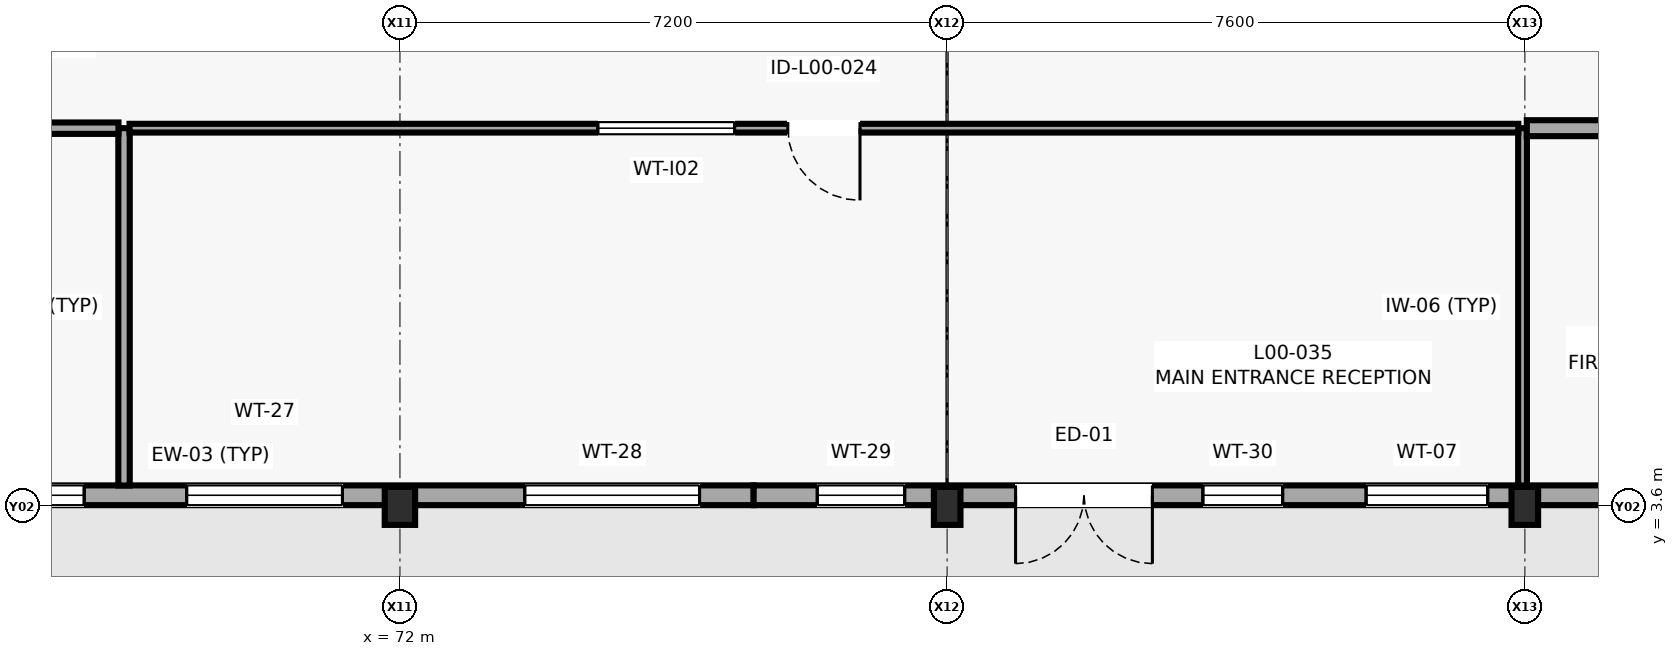
"""IFC4 building model, lengths in metres.
Left out: names, types, materials, properties, quantities, classifications, styles, units other than length and angle.
Written with IfcOpenShell. Run it as: python <this file> out.ifc"""

import sys

from ifc_helpers import new_model, si_unit, direction, frame, frame_2d, origin, origin_2d, place, context, subcontext, project, spatial, rectangle, extrude, element, fill, save


model = new_model("IFC4")
c1 = context("Model", 3, precision=1e-05, world=origin(), true_north=direction((0.0, 1.0)))
c2 = subcontext(c1, "Body", "Model", "MODEL_VIEW")
j1 = project(units=[si_unit("LENGTHUNIT", "METRE"), si_unit("PLANEANGLEUNIT", "RADIAN")], contexts=[c1])
p1 = place(None, origin())
s1 = spatial("IfcSite", under=j1, at=p1, CompositionType="ELEMENT")
p2 = place(p1, origin())
s2 = spatial("IfcBuilding", under=s1, at=p2, CompositionType="ELEMENT")
p3 = place(p2, origin())
s3 = spatial("IfcBuildingStorey", under=s2, at=p3, CompositionType="ELEMENT", Elevation=0.0)
p4 = place(p3, frame((72.0, 3.6, 0.0), z_axis=(0.0, 0.0, 1.0), x_axis=(1.0, 0.0, 0.0)))
e1 = element("IfcColumn", 1, at=p4, inside=s3, PredefinedType="PILASTER", context=c2, shape_type="SweptSolid", body=[
    extrude(rectangle(XDim=0.4, YDim=0.5, at=origin_2d()), origin(), (0.0, 0.0, 1.0), 4.2),
])
for number, where, z_axis, x_axis in (
    (2, (79.2, 3.6, 0.0), (0.0, 0.0, 1.0), (1.0, 0.0, 0.0)),
    (3, (86.8, 3.6, 0.0), (0.0, 0.0, 1.0), (1.0, 0.0, 0.0)),
):
    element("IfcColumn", number, at=place(p3, frame(where, z_axis=z_axis, x_axis=x_axis)), inside=s3, PredefinedType="PILASTER", context=c2, shape_type="SweptSolid", body=[
        extrude(rectangle(XDim=0.35, YDim=0.5, at=origin_2d()), origin(), (0.0, 0.0, 1.0), 4.2),
    ])
p5 = place(p3, frame((61.761, 3.74, 0.0), z_axis=(0.0, 0.0, 1.0), x_axis=(1.0, 0.0, 0.0)))
e4 = element("IfcWall", 4, at=p5, inside=s3, PredefinedType="SOLIDWALL", context=c2, shape_type="SweptSolid", body=[
    extrude(rectangle(XDim=14.893, YDim=0.26, at=frame_2d((7.447, 0.0))), origin(), (0.0, 0.0, 1.0), 3.255),
])
p6 = place(p5, frame((0.562, 0.0, 0.85)))
e5 = element("IfcOpeningElement", 5, at=p6, cuts=e4, PredefinedType="OPENING", context=c2, shape_type="SweptSolid", body=[
    extrude(rectangle(XDim=1.7, YDim=1.75, at=frame_2d((0.85, 0.875))), frame((0.0, 0.14, 0.0), z_axis=(0.0, -1.0, 0.0), x_axis=(1.0, 0.0, 0.0)), (0.0, 0.0, 1.0), 0.28),
])
p7 = place(p5, frame((4.185, 0.0, 0.85)))
e6 = element("IfcOpeningElement", 6, at=p7, cuts=e4, PredefinedType="OPENING", context=c2, shape_type="SweptSolid", body=[
    extrude(rectangle(XDim=1.9, YDim=1.65, at=frame_2d((0.95, 0.825))), frame((0.0, 0.14, 0.0), z_axis=(0.0, -1.0, 0.0), x_axis=(1.0, 0.0, 0.0)), (0.0, 0.0, 1.0), 0.28),
])
p8 = place(p5, frame((7.433, 0.0, 1.05)))
e7 = element("IfcOpeningElement", 7, at=p8, cuts=e4, PredefinedType="OPENING", context=c2, shape_type="SweptSolid", body=[
    extrude(rectangle(XDim=2.05, YDim=1.55, at=frame_2d((1.025, 0.775))), frame((0.0, 0.14, 0.0), z_axis=(0.0, -1.0, 0.0), x_axis=(1.0, 0.0, 0.0)), (0.0, 0.0, 1.0), 0.28),
])
p9 = place(p5, frame((11.881, 0.0, 1.05)))
e8 = element("IfcOpeningElement", 8, at=p9, cuts=e4, PredefinedType="OPENING", context=c2, shape_type="SweptSolid", body=[
    extrude(rectangle(XDim=2.3, YDim=1.45, at=frame_2d((1.15, 0.725))), frame((0.0, 0.14, 0.0), z_axis=(0.0, -1.0, 0.0), x_axis=(1.0, 0.0, 0.0)), (0.0, 0.0, 1.0), 0.28),
])
p10 = place(p3, frame((76.654, 3.74, 0.0), z_axis=(0.0, 0.0, 1.0), x_axis=(1.0, 0.0, 0.0)))
e9 = element("IfcWall", 9, at=p10, inside=s3, PredefinedType="SOLIDWALL", context=c2, shape_type="SweptSolid", body=[
    extrude(rectangle(XDim=14.893, YDim=0.26, at=frame_2d((7.447, 0.0))), origin(), (0.0, 0.0, 1.0), 3.205),
])
p11 = place(p10, frame((3.446, 0.0, 0.0)))
e10 = element("IfcOpeningElement", 10, at=p11, cuts=e9, PredefinedType="OPENING", context=c2, shape_type="SweptSolid", body=[
    extrude(rectangle(XDim=1.8, YDim=2.4, at=frame_2d((0.9, 1.2))), frame((0.0, 0.14, 0.0), z_axis=(0.0, -1.0, 0.0), x_axis=(1.0, 0.0, 0.0)), (0.0, 0.0, 1.0), 0.28),
])
p12 = place(p10, frame((0.837, 0.0, 1.05)))
e11 = element("IfcOpeningElement", 11, at=p12, cuts=e9, PredefinedType="OPENING", context=c2, shape_type="SweptSolid", body=[
    extrude(rectangle(XDim=1.15, YDim=1.4, at=frame_2d((0.575, 0.7))), frame((0.0, 0.14, 0.0), z_axis=(0.0, -1.0, 0.0), x_axis=(1.0, 0.0, 0.0)), (0.0, 0.0, 1.0), 0.28),
])
p13 = place(p10, frame((5.91, 0.0, 1.05)))
e12 = element("IfcOpeningElement", 12, at=p13, cuts=e9, PredefinedType="OPENING", context=c2, shape_type="SweptSolid", body=[
    extrude(rectangle(XDim=1.05, YDim=1.3, at=frame_2d((0.525, 0.65))), frame((0.0, 0.14, 0.0), z_axis=(0.0, -1.0, 0.0), x_axis=(1.0, 0.0, 0.0)), (0.0, 0.0, 1.0), 0.28),
])
p14 = place(p10, frame((8.058, 0.0, 1.05)))
e13 = element("IfcOpeningElement", 13, at=p14, cuts=e9, PredefinedType="OPENING", context=c2, shape_type="SweptSolid", body=[
    extrude(rectangle(XDim=1.6, YDim=1.35, at=frame_2d((0.8, 0.675))), frame((0.0, 0.14, 0.0), z_axis=(0.0, -1.0, 0.0), x_axis=(1.0, 0.0, 0.0)), (0.0, 0.0, 1.0), 0.28),
])
p15 = place(p10, frame((11.931, 0.0, 1.05)))
e14 = element("IfcOpeningElement", 14, at=p15, cuts=e9, PredefinedType="OPENING", context=c2, shape_type="SweptSolid", body=[
    extrude(rectangle(XDim=2.2, YDim=1.35, at=frame_2d((1.1, 0.675))), frame((0.0, 0.14, 0.0), z_axis=(0.0, -1.0, 0.0), x_axis=(1.0, 0.0, 0.0)), (0.0, 0.0, 1.0), 0.28),
])
p16 = place(p3, frame((68.37, 3.868, 0.0), z_axis=(0.0, 0.0, 1.0), x_axis=(0.0, 1.0, 0.0)))
e15 = element("IfcWall", 15, at=p16, inside=s3, PredefinedType="PARTITIONING", context=c2, shape_type="SweptSolid", body=[
    extrude(rectangle(XDim=4.702, YDim=0.15, at=frame_2d((2.351, 0.0))), origin(), (0.0, 0.0, 1.0), 3.355),
])
p17 = place(p3, frame((68.297, 8.57, 0.0), z_axis=(0.0, 0.0, 1.0), x_axis=(-1.0, 0.0, 0.0)))
e16 = element("IfcWall", 16, at=p17, inside=s3, PredefinedType="PARTITIONING", context=c2, shape_type="SweptSolid", body=[
    extrude(rectangle(XDim=25.059, YDim=0.15, at=frame_2d((12.53, 0.0))), origin(), (0.0, 0.0, 1.0), 3.955),
])
p18 = place(p17, frame((11.829, 0.0, 0.0)))
e17 = element("IfcOpeningElement", 17, at=p18, cuts=e16, PredefinedType="OPENING", context=c2, shape_type="SweptSolid", body=[
    extrude(rectangle(XDim=1.4, YDim=2.2, at=frame_2d((0.7, 1.1))), frame((0.0, 0.085, 0.0), z_axis=(0.0, -1.0, 0.0), x_axis=(1.0, 0.0, 0.0)), (0.0, 0.0, 1.0), 0.17),
])
p19 = place(p3, frame((86.77, 3.868, 0.0), z_axis=(0.0, 0.0, 1.0), x_axis=(0.0, 1.0, 0.0)))
e18 = element("IfcWall", 18, at=p19, inside=s3, PredefinedType="PARTITIONING", context=c2, shape_type="SweptSolid", body=[
    extrude(rectangle(XDim=4.702, YDim=0.115, at=frame_2d((2.351, 0.0))), origin(), (0.0, 0.0, 1.0), 3.455),
])
p20 = place(p3, frame((86.714, 8.57, 0.0), z_axis=(0.0, 0.0, 1.0), x_axis=(-1.0, 0.0, 0.0)))
e19 = element("IfcWall", 19, at=p20, inside=s3, PredefinedType="PARTITIONING", context=c2, shape_type="SweptSolid", body=[
    extrude(rectangle(XDim=18.271, YDim=0.115, at=frame_2d((9.135, 0.0))), origin(), (0.0, 0.0, 1.0), 3.955),
])
p21 = place(p20, frame((8.661, 0.0, 0.0)))
e20 = element("IfcOpeningElement", 20, at=p21, cuts=e19, PredefinedType="OPENING", context=c2, shape_type="SweptSolid", body=[
    extrude(rectangle(XDim=0.95, YDim=2.05, at=frame_2d((0.475, 1.025))), frame((0.0, 0.067, 0.0), z_axis=(0.0, -1.0, 0.0), x_axis=(1.0, 0.0, 0.0)), (0.0, 0.0, 1.0), 0.135),
])
p22 = place(p20, frame((10.311, 0.0, 1.05)))
e21 = element("IfcOpeningElement", 21, at=p22, cuts=e19, PredefinedType="OPENING", context=c2, shape_type="SweptSolid", body=[
    extrude(rectangle(XDim=1.8, YDim=1.2, at=frame_2d((0.9, 0.6))), frame((0.0, 0.067, 0.0), z_axis=(0.0, -1.0, 0.0), x_axis=(1.0, 0.0, 0.0)), (0.0, 0.0, 1.0), 0.135),
])
p23 = place(p3, frame((93.962, 8.57, 0.0), z_axis=(0.0, 0.0, 1.0), x_axis=(-1.0, 0.0, 0.0)))
e22 = element("IfcWall", 22, at=p23, inside=s3, PredefinedType="PARTITIONING", context=c2, shape_type="SweptSolid", body=[
    extrude(rectangle(XDim=7.136, YDim=0.21, at=frame_2d((3.568, 0.0))), origin(), (0.0, 0.0, 1.0), 3.955),
])
p24 = place(p23, frame((3.068, 0.0, 0.0)))
e23 = element("IfcOpeningElement", 23, at=p24, cuts=e22, PredefinedType="OPENING", context=c2, shape_type="SweptSolid", body=[
    extrude(rectangle(XDim=1.0, YDim=2.15, at=frame_2d((0.5, 1.075))), frame((0.0, 0.115, 0.0), z_axis=(0.0, -1.0, 0.0), x_axis=(1.0, 0.0, 0.0)), (0.0, 0.0, 1.0), 0.23),
])
p25 = place(p11, frame((1.8, 0.0, 0.0), z_axis=(0.0, 0.0, 1.0), x_axis=(-1.0, 0.0, 0.0)))
e24 = element("IfcDoor", 24, at=p25, inside=s3, OperationType="DOUBLE_DOOR_SINGLE_SWING", PredefinedType="DOOR", context=c2, shape_type="SweptSolid", body=[
    extrude(rectangle(XDim=1.8, YDim=2.4, at=frame_2d((0.9, 1.2))), frame((0.0, 0.025, 0.0), z_axis=(0.0, -1.0, 0.0), x_axis=(1.0, 0.0, 0.0)), (0.0, 0.0, 1.0), 0.05),
])
fill(e10, e24)
p26 = place(p7, origin())
e25 = element("IfcWindow", 25, at=p26, inside=s3, PartitioningType="SINGLE_PANEL", PredefinedType="WINDOW", context=c2, shape_type="SweptSolid", body=[
    extrude(rectangle(XDim=1.9, YDim=1.65, at=frame_2d((0.95, 0.825))), frame((0.0, 0.03, 0.0), z_axis=(0.0, -1.0, 0.0), x_axis=(1.0, 0.0, 0.0)), (0.0, 0.0, 1.0), 0.06),
])
fill(e6, e25)
p27 = place(p8, origin())
e26 = element("IfcWindow", 26, at=p27, inside=s3, PartitioningType="SINGLE_PANEL", PredefinedType="WINDOW", context=c2, shape_type="SweptSolid", body=[
    extrude(rectangle(XDim=2.05, YDim=1.55, at=frame_2d((1.025, 0.775))), frame((0.0, 0.03, 0.0), z_axis=(0.0, -1.0, 0.0), x_axis=(1.0, 0.0, 0.0)), (0.0, 0.0, 1.0), 0.06),
])
fill(e7, e26)
p28 = place(p9, origin())
e27 = element("IfcWindow", 27, at=p28, inside=s3, PartitioningType="SINGLE_PANEL", PredefinedType="WINDOW", context=c2, shape_type="SweptSolid", body=[
    extrude(rectangle(XDim=2.3, YDim=1.45, at=frame_2d((1.15, 0.725))), frame((0.0, 0.03, 0.0), z_axis=(0.0, -1.0, 0.0), x_axis=(1.0, 0.0, 0.0)), (0.0, 0.0, 1.0), 0.06),
])
fill(e8, e27)
p29 = place(p12, origin())
e28 = element("IfcWindow", 28, at=p29, inside=s3, PartitioningType="SINGLE_PANEL", PredefinedType="WINDOW", context=c2, shape_type="SweptSolid", body=[
    extrude(rectangle(XDim=1.15, YDim=1.4, at=frame_2d((0.575, 0.7))), frame((0.0, 0.03, 0.0), z_axis=(0.0, -1.0, 0.0), x_axis=(1.0, 0.0, 0.0)), (0.0, 0.0, 1.0), 0.06),
])
fill(e11, e28)
p30 = place(p13, origin())
e29 = element("IfcWindow", 29, at=p30, inside=s3, PartitioningType="SINGLE_PANEL", PredefinedType="WINDOW", context=c2, shape_type="SweptSolid", body=[
    extrude(rectangle(XDim=1.05, YDim=1.3, at=frame_2d((0.525, 0.65))), frame((0.0, 0.03, 0.0), z_axis=(0.0, -1.0, 0.0), x_axis=(1.0, 0.0, 0.0)), (0.0, 0.0, 1.0), 0.06),
])
fill(e12, e29)
p31 = place(p14, origin())
e30 = element("IfcWindow", 30, at=p31, inside=s3, PartitioningType="SINGLE_PANEL", PredefinedType="WINDOW", context=c2, shape_type="SweptSolid", body=[
    extrude(rectangle(XDim=1.6, YDim=1.35, at=frame_2d((0.8, 0.675))), frame((0.0, 0.03, 0.0), z_axis=(0.0, -1.0, 0.0), x_axis=(1.0, 0.0, 0.0)), (0.0, 0.0, 1.0), 0.06),
])
fill(e13, e30)
p32 = place(p21, origin())
e31 = element("IfcDoor", 31, at=p32, inside=s3, OperationType="SINGLE_SWING_LEFT", PredefinedType="DOOR", context=c2, shape_type="SweptSolid", body=[
    extrude(rectangle(XDim=0.95, YDim=2.05, at=frame_2d((0.475, 1.025))), frame((0.0, 0.025, 0.0), z_axis=(0.0, -1.0, 0.0), x_axis=(1.0, 0.0, 0.0)), (0.0, 0.0, 1.0), 0.05),
])
fill(e20, e31)
p33 = place(p22, origin())
e32 = element("IfcWindow", 32, at=p33, inside=s3, PartitioningType="SINGLE_PANEL", PredefinedType="WINDOW", context=c2, shape_type="SweptSolid", body=[
    extrude(rectangle(XDim=1.8, YDim=1.2, at=frame_2d((0.9, 0.6))), frame((0.0, 0.03, 0.0), z_axis=(0.0, -1.0, 0.0), x_axis=(1.0, 0.0, 0.0)), (0.0, 0.0, 1.0), 0.06),
])
fill(e21, e32)
save(model, sys.argv[1])
